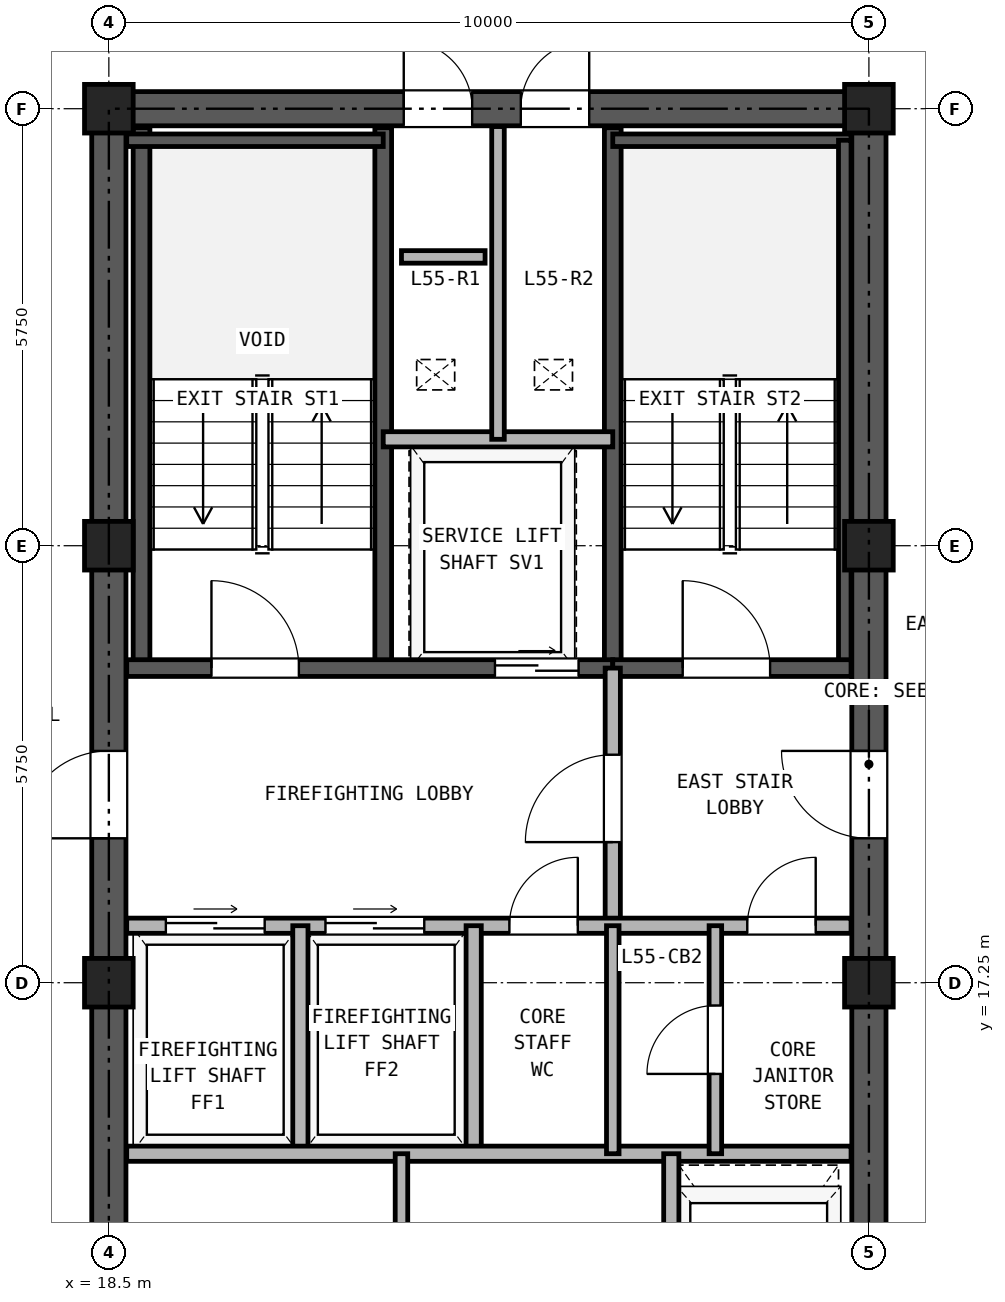
"""IFC4 building model, lengths in metres.
Left out: names, types, materials, properties, quantities, classifications, styles, units other than length and angle.
Written with IfcOpenShell. Run it as: python <this file> out.ifc"""

import sys

from ifc_helpers import new_model, si_unit, direction, frame, frame_2d, origin, origin_2d, place, context, subcontext, project, spatial, rectangle, hollow_rectangle, extrude, source, transform, mapped, element, fill, save


model = new_model("IFC4")
c1 = context("Model", 3, precision=1e-05, world=origin(), true_north=direction((0.0, 1.0)))
c2 = subcontext(c1, "Body", "Model", "MODEL_VIEW")
j1 = project(units=[si_unit("LENGTHUNIT", "METRE"), si_unit("PLANEANGLEUNIT", "RADIAN")], contexts=[c1])
p1 = place(None, origin())
s1 = spatial("IfcSite", under=j1, at=p1, CompositionType="ELEMENT")
p2 = place(p1, origin())
s2 = spatial("IfcBuilding", under=s1, at=p2, CompositionType="ELEMENT")
p3 = place(p2, frame((0.0, 0.0, 196.4)))
s3 = spatial("IfcBuildingStorey", under=s2, at=p3, CompositionType="ELEMENT", Elevation=196.4)
m1 = source(origin(), c2, "Body", "SweptSolid", [
    extrude(hollow_rectangle(XDim=0.64, YDim=0.64, WallThickness=0.035, at=origin_2d()), origin(), (0.0, 0.0, 1.0), 2.95),
])
for number, where, z_axis, x_axis in (
    (1, (18.5, 17.25, 0.0), (0.0, 0.0, 1.0), (1.0, 0.0, 0.0)),
    (2, (18.5, 23.0, 0.0), (0.0, 0.0, 1.0), (1.0, 0.0, 0.0)),
    (3, (18.5, 28.75, 0.0), (0.0, 0.0, 1.0), (1.0, 0.0, 0.0)),
    (4, (28.5, 17.25, 0.0), (0.0, 0.0, 1.0), (1.0, 0.0, 0.0)),
    (5, (28.5, 23.0, 0.0), (0.0, 0.0, 1.0), (1.0, 0.0, 0.0)),
    (6, (28.5, 28.75, 0.0), (0.0, 0.0, 1.0), (1.0, 0.0, 0.0)),
):
    element("IfcColumn", number, at=place(p3, frame(where, z_axis=z_axis, x_axis=x_axis)), inside=s3, PredefinedType="COLUMN", context=c2, shape_type="MappedRepresentation", body=[
        mapped(m1, transform((0.0, 0.0, 0.0), x_axis=(1.0, 0.0, 0.0), y_axis=(0.0, 1.0, 0.0), z_axis=(0.0, 0.0, 1.0), scale=1.0)),
    ])
p4 = place(p3, frame((18.275, 28.75, 0.0), z_axis=(0.0, 0.0, 1.0), x_axis=(1.0, 0.0, 0.0)))
e7 = element("IfcWall", 7, at=p4, inside=s3, PredefinedType="SHEAR", context=c2, shape_type="SweptSolid", body=[
    extrude(rectangle(XDim=10.45, YDim=0.45, at=frame_2d((5.225, 0.0))), origin(), (0.0, 0.0, 1.0), 2.95),
])
p5 = place(p4, frame((4.105, 0.0, 0.0)))
e8 = element("IfcOpeningElement", 8, at=p5, cuts=e7, PredefinedType="OPENING", context=c2, shape_type="SweptSolid", body=[
    extrude(rectangle(XDim=0.9, YDim=2.05, at=frame_2d((0.45, 1.025))), frame((0.0, 0.235, 0.0), z_axis=(0.0, -1.0, 0.0), x_axis=(1.0, 0.0, 0.0)), (0.0, 0.0, 1.0), 0.47),
])
p6 = place(p4, frame((5.645, 0.0, 0.0)))
e9 = element("IfcOpeningElement", 9, at=p6, cuts=e7, PredefinedType="OPENING", context=c2, shape_type="SweptSolid", body=[
    extrude(rectangle(XDim=0.9, YDim=2.05, at=frame_2d((0.45, 1.025))), frame((0.0, 0.235, 0.0), z_axis=(0.0, -1.0, 0.0), x_axis=(1.0, 0.0, 0.0)), (0.0, 0.0, 1.0), 0.47),
])
p7 = place(p3, frame((18.5, 11.725, 0.0), z_axis=(0.0, 0.0, 1.0), x_axis=(0.0, 1.0, 0.0)))
e10 = element("IfcWall", 10, at=p7, inside=s3, PredefinedType="SHEAR", context=c2, shape_type="SweptSolid", body=[
    extrude(rectangle(XDim=16.8, YDim=0.45, at=frame_2d((8.4, 0.0))), origin(), (0.0, 0.0, 1.0), 2.95),
])
p8 = place(p7, frame((7.425, 0.0, 0.0)))
e11 = element("IfcOpeningElement", 11, at=p8, cuts=e10, PredefinedType="OPENING", context=c2, shape_type="SweptSolid", body=[
    extrude(rectangle(XDim=1.15, YDim=2.2, at=frame_2d((0.575, 1.1))), frame((0.0, 0.235, 0.0), z_axis=(0.0, -1.0, 0.0), x_axis=(1.0, 0.0, 0.0)), (0.0, 0.0, 1.0), 0.47),
])
p9 = place(p3, frame((28.5, 11.725, 0.0), z_axis=(0.0, 0.0, 1.0), x_axis=(0.0, 1.0, 0.0)))
e12 = element("IfcWall", 12, at=p9, inside=s3, PredefinedType="SHEAR", context=c2, shape_type="SweptSolid", body=[
    extrude(rectangle(XDim=16.8, YDim=0.45, at=frame_2d((8.4, 0.0))), origin(), (0.0, 0.0, 1.0), 2.95),
])
p10 = place(p9, frame((7.425, 0.0, 0.0)))
e13 = element("IfcOpeningElement", 13, at=p10, cuts=e12, PredefinedType="OPENING", context=c2, shape_type="SweptSolid", body=[
    extrude(rectangle(XDim=1.15, YDim=2.2, at=frame_2d((0.575, 1.1))), frame((0.0, 0.235, 0.0), z_axis=(0.0, -1.0, 0.0), x_axis=(1.0, 0.0, 0.0)), (0.0, 0.0, 1.0), 0.47),
])
for number, where, z_axis, x_axis in (
    (14, (18.93, 21.39, 0.0), (0.0, 0.0, 1.0), (0.0, 1.0, 0.0)),
    (15, (22.11, 21.39, 0.0), (0.0, 0.0, 1.0), (0.0, 1.0, 0.0)),
    (16, (25.13, 21.39, 0.0), (0.0, 0.0, 1.0), (0.0, 1.0, 0.0)),
):
    element("IfcWall", number, at=place(p3, frame(where, z_axis=z_axis, x_axis=x_axis)), inside=s3, PredefinedType="SOLIDWALL", context=c2, shape_type="SweptSolid", body=[
        extrude(rectangle(XDim=7.11, YDim=0.22, at=frame_2d((3.555, 0.0))), origin(), (0.0, 0.0, 1.0), 2.95),
    ])
p11 = place(p3, frame((18.735, 28.335, 0.0), z_axis=(0.0, 0.0, 1.0), x_axis=(1.0, 0.0, 0.0)))
e17 = element("IfcWall", 17, at=p11, inside=s3, PredefinedType="PARTITIONING", context=c2, shape_type="SweptSolid", body=[
    extrude(rectangle(XDim=3.375, YDim=0.165, at=frame_2d((1.688, 0.0))), origin(), (0.0, 0.0, 1.0), 2.95),
])
p12 = place(p3, frame((25.13, 28.335, 0.0), z_axis=(0.0, 0.0, 1.0), x_axis=(1.0, 0.0, 0.0)))
e18 = element("IfcWall", 18, at=p12, inside=s3, PredefinedType="PARTITIONING", context=c2, shape_type="SweptSolid", body=[
    extrude(rectangle(XDim=3.135, YDim=0.165, at=frame_2d((1.567, 0.0))), origin(), (0.0, 0.0, 1.0), 2.95),
])
p13 = place(p3, frame((28.183, 21.39, 0.0), z_axis=(0.0, 0.0, 1.0), x_axis=(0.0, 1.0, 0.0)))
e19 = element("IfcWall", 19, at=p13, inside=s3, PredefinedType="PARTITIONING", context=c2, shape_type="SweptSolid", body=[
    extrude(rectangle(XDim=6.945, YDim=0.165, at=frame_2d((3.473, 0.0))), origin(), (0.0, 0.0, 1.0), 2.95),
])
p14 = place(p3, frame((18.735, 21.39, 0.0), z_axis=(0.0, 0.0, 1.0), x_axis=(1.0, 0.0, 0.0)))
e20 = element("IfcWall", 20, at=p14, inside=s3, PredefinedType="SOLIDWALL", context=c2, shape_type="SweptSolid", body=[
    extrude(rectangle(XDim=6.395, YDim=0.22, at=frame_2d((3.197, 0.0))), origin(), (0.0, 0.0, 1.0), 2.95),
])
p15 = place(p14, frame((1.115, 0.0, 0.0)))
e21 = element("IfcOpeningElement", 21, at=p15, cuts=e20, PredefinedType="OPENING", context=c2, shape_type="SweptSolid", body=[
    extrude(rectangle(XDim=1.15, YDim=2.2, at=frame_2d((0.575, 1.1))), frame((0.0, 0.12, 0.0), z_axis=(0.0, -1.0, 0.0), x_axis=(1.0, 0.0, 0.0)), (0.0, 0.0, 1.0), 0.24),
])
p16 = place(p14, frame((4.845, 0.0, 0.0)))
e22 = element("IfcOpeningElement", 22, at=p16, cuts=e20, PredefinedType="OPENING", context=c2, shape_type="SweptSolid", body=[
    extrude(rectangle(XDim=1.1, YDim=2.25, at=frame_2d((0.55, 1.125))), frame((0.0, 0.12, 0.0), z_axis=(0.0, -1.0, 0.0), x_axis=(1.0, 0.0, 0.0)), (0.0, 0.0, 1.0), 0.24),
])
p17 = place(p3, frame((25.13, 21.39, 0.0), z_axis=(0.0, 0.0, 1.0), x_axis=(1.0, 0.0, 0.0)))
e23 = element("IfcWall", 23, at=p17, inside=s3, PredefinedType="SOLIDWALL", context=c2, shape_type="SweptSolid", body=[
    extrude(rectangle(XDim=3.135, YDim=0.22, at=frame_2d((1.567, 0.0))), origin(), (0.0, 0.0, 1.0), 2.95),
])
p18 = place(p17, frame((0.92, 0.0, 0.0)))
e24 = element("IfcOpeningElement", 24, at=p18, cuts=e23, PredefinedType="OPENING", context=c2, shape_type="SweptSolid", body=[
    extrude(rectangle(XDim=1.15, YDim=2.2, at=frame_2d((0.575, 1.1))), frame((0.0, 0.12, 0.0), z_axis=(0.0, -1.0, 0.0), x_axis=(1.0, 0.0, 0.0)), (0.0, 0.0, 1.0), 0.24),
])
p19 = place(p3, frame((22.11, 24.4, 0.0), z_axis=(0.0, 0.0, 1.0), x_axis=(1.0, 0.0, 0.0)))
e25 = element("IfcWall", 25, at=p19, inside=s3, PredefinedType="PARTITIONING", context=c2, shape_type="SweptSolid", body=[
    extrude(rectangle(XDim=3.02, YDim=0.2, at=frame_2d((1.51, 0.0))), origin(), (0.0, 0.0, 1.0), 2.95),
])
p20 = place(p3, frame((23.62, 24.4, 0.0), z_axis=(0.0, 0.0, 1.0), x_axis=(0.0, 1.0, 0.0)))
e26 = element("IfcWall", 26, at=p20, inside=s3, PredefinedType="PARTITIONING", context=c2, shape_type="SweptSolid", body=[
    extrude(rectangle(XDim=4.115, YDim=0.165, at=frame_2d((2.058, 0.0))), origin(), (0.0, 0.0, 1.0), 2.95),
])
p21 = place(p3, frame((25.13, 18.0, 0.0), z_axis=(0.0, 0.0, 1.0), x_axis=(0.0, 1.0, 0.0)))
e27 = element("IfcWall", 27, at=p21, inside=s3, PredefinedType="PARTITIONING", context=c2, shape_type="SweptSolid", body=[
    extrude(rectangle(XDim=3.39, YDim=0.2, at=frame_2d((1.695, 0.0))), origin(), (0.0, 0.0, 1.0), 2.95),
])
p22 = place(p21, frame((1.1, 0.0, 0.0)))
e28 = element("IfcOpeningElement", 28, at=p22, cuts=e27, PredefinedType="OPENING", context=c2, shape_type="SweptSolid", body=[
    extrude(rectangle(XDim=1.15, YDim=2.2, at=frame_2d((0.575, 1.1))), frame((0.0, 0.11, 0.0), z_axis=(0.0, -1.0, 0.0), x_axis=(1.0, 0.0, 0.0)), (0.0, 0.0, 1.0), 0.22),
])
p23 = place(p3, frame((18.735, 18.0, 0.0), z_axis=(0.0, 0.0, 1.0), x_axis=(1.0, 0.0, 0.0)))
e29 = element("IfcWall", 29, at=p23, inside=s3, PredefinedType="PARTITIONING", context=c2, shape_type="SweptSolid", body=[
    extrude(rectangle(XDim=9.53, YDim=0.2, at=frame_2d((4.765, 0.0))), origin(), (0.0, 0.0, 1.0), 2.95),
])
p24 = place(p23, frame((0.515, 0.0, 0.0)))
e30 = element("IfcOpeningElement", 30, at=p24, cuts=e29, PredefinedType="OPENING", context=c2, shape_type="SweptSolid", body=[
    extrude(rectangle(XDim=1.3, YDim=2.3, at=frame_2d((0.65, 1.15))), frame((0.0, 0.11, 0.0), z_axis=(0.0, -1.0, 0.0), x_axis=(1.0, 0.0, 0.0)), (0.0, 0.0, 1.0), 0.22),
])
p25 = place(p23, frame((2.615, 0.0, 0.0)))
e31 = element("IfcOpeningElement", 31, at=p25, cuts=e29, PredefinedType="OPENING", context=c2, shape_type="SweptSolid", body=[
    extrude(rectangle(XDim=1.3, YDim=2.3, at=frame_2d((0.65, 1.15))), frame((0.0, 0.11, 0.0), z_axis=(0.0, -1.0, 0.0), x_axis=(1.0, 0.0, 0.0)), (0.0, 0.0, 1.0), 0.22),
])
p26 = place(p23, frame((5.035, 0.0, 0.0)))
e32 = element("IfcOpeningElement", 32, at=p26, cuts=e29, PredefinedType="OPENING", context=c2, shape_type="SweptSolid", body=[
    extrude(rectangle(XDim=0.9, YDim=2.05, at=frame_2d((0.45, 1.025))), frame((0.0, 0.11, 0.0), z_axis=(0.0, -1.0, 0.0), x_axis=(1.0, 0.0, 0.0)), (0.0, 0.0, 1.0), 0.22),
])
p27 = place(p23, frame((8.165, 0.0, 0.0)))
e33 = element("IfcOpeningElement", 33, at=p27, cuts=e29, PredefinedType="OPENING", context=c2, shape_type="SweptSolid", body=[
    extrude(rectangle(XDim=0.9, YDim=2.05, at=frame_2d((0.45, 1.025))), frame((0.0, 0.11, 0.0), z_axis=(0.0, -1.0, 0.0), x_axis=(1.0, 0.0, 0.0)), (0.0, 0.0, 1.0), 0.22),
])
for number, where, z_axis, x_axis in (
    (34, (21.02, 15.0, 0.0), (0.0, 0.0, 1.0), (0.0, 1.0, 0.0)),
    (35, (23.3, 15.0, 0.0), (0.0, 0.0, 1.0), (0.0, 1.0, 0.0)),
):
    element("IfcWall", number, at=place(p3, frame(where, z_axis=z_axis, x_axis=x_axis)), inside=s3, PredefinedType="PARTITIONING", context=c2, shape_type="SweptSolid", body=[
        extrude(rectangle(XDim=3.0, YDim=0.2, at=frame_2d((1.5, 0.0))), origin(), (0.0, 0.0, 1.0), 2.95),
    ])
p28 = place(p3, frame((18.735, 15.0, 0.0), z_axis=(0.0, 0.0, 1.0), x_axis=(1.0, 0.0, 0.0)))
e36 = element("IfcWall", 36, at=p28, inside=s3, PredefinedType="PARTITIONING", context=c2, shape_type="SweptSolid", body=[
    extrude(rectangle(XDim=9.53, YDim=0.2, at=frame_2d((4.765, 0.0))), origin(), (0.0, 0.0, 1.0), 2.95),
])
p29 = place(p3, frame((25.13, 15.0, 0.0), z_axis=(0.0, 0.0, 1.0), x_axis=(0.0, 1.0, 0.0)))
e37 = element("IfcWall", 37, at=p29, inside=s3, PredefinedType="PARTITIONING", context=c2, shape_type="SweptSolid", body=[
    extrude(rectangle(XDim=3.0, YDim=0.165, at=frame_2d((1.5, 0.0))), origin(), (0.0, 0.0, 1.0), 2.95),
])
p30 = place(p3, frame((26.48, 15.0, 0.0), z_axis=(0.0, 0.0, 1.0), x_axis=(0.0, 1.0, 0.0)))
e38 = element("IfcWall", 38, at=p30, inside=s3, PredefinedType="PARTITIONING", context=c2, shape_type="SweptSolid", body=[
    extrude(rectangle(XDim=3.0, YDim=0.165, at=frame_2d((1.5, 0.0))), origin(), (0.0, 0.0, 1.0), 2.95),
])
p31 = place(p30, frame((1.05, 0.0, 0.0)))
e39 = element("IfcOpeningElement", 39, at=p31, cuts=e38, PredefinedType="OPENING", context=c2, shape_type="SweptSolid", body=[
    extrude(rectangle(XDim=0.9, YDim=2.05, at=frame_2d((0.45, 1.025))), frame((0.0, 0.093, 0.0), z_axis=(0.0, -1.0, 0.0), x_axis=(1.0, 0.0, 0.0)), (0.0, 0.0, 1.0), 0.185),
])
p32 = place(p3, frame((22.35, 11.735, 0.0), z_axis=(0.0, 0.0, 1.0), x_axis=(0.0, 1.0, 0.0)))
e40 = element("IfcWall", 40, at=p32, inside=s3, PredefinedType="PARTITIONING", context=c2, shape_type="SweptSolid", body=[
    extrude(rectangle(XDim=3.265, YDim=0.165, at=frame_2d((1.632, 0.0))), origin(), (0.0, 0.0, 1.0), 2.95),
])
p33 = place(p3, frame((25.9, 11.735, 0.0), z_axis=(0.0, 0.0, 1.0), x_axis=(0.0, 1.0, 0.0)))
e41 = element("IfcWall", 41, at=p33, inside=s3, PredefinedType="PARTITIONING", context=c2, shape_type="SweptSolid", body=[
    extrude(rectangle(XDim=3.265, YDim=0.2, at=frame_2d((1.632, 0.0))), origin(), (0.0, 0.0, 1.0), 2.95),
])
p34 = place(p3, frame((22.35, 26.8, 0.0), z_axis=(0.0, 0.0, 1.0), x_axis=(1.0, 0.0, 0.0)))
e42 = element("IfcWall", 42, at=p34, inside=s3, PredefinedType="PARTITIONING", context=c2, shape_type="SweptSolid", body=[
    extrude(rectangle(XDim=1.1, YDim=0.165, at=frame_2d((0.55, 0.0))), origin(), (0.0, 0.0, 1.0), 2.95),
])
p35 = place(p15, frame((1.15, 0.0, 0.0), z_axis=(0.0, 0.0, 1.0), x_axis=(-1.0, 0.0, 0.0)))
e43 = element("IfcDoor", 43, at=p35, inside=s3, OperationType="SINGLE_SWING_LEFT", PredefinedType="DOOR", context=c2, shape_type="SweptSolid", body=[
    extrude(rectangle(XDim=1.15, YDim=2.2, at=frame_2d((0.575, 1.1))), frame((0.0, 0.025, 0.0), z_axis=(0.0, -1.0, 0.0), x_axis=(1.0, 0.0, 0.0)), (0.0, 0.0, 1.0), 0.05),
])
fill(e21, e43)
p36 = place(p18, frame((1.15, 0.0, 0.0), z_axis=(0.0, 0.0, 1.0), x_axis=(-1.0, 0.0, 0.0)))
e44 = element("IfcDoor", 44, at=p36, inside=s3, OperationType="SINGLE_SWING_LEFT", PredefinedType="DOOR", context=c2, shape_type="SweptSolid", body=[
    extrude(rectangle(XDim=1.15, YDim=2.2, at=frame_2d((0.575, 1.1))), frame((0.0, 0.025, 0.0), z_axis=(0.0, -1.0, 0.0), x_axis=(1.0, 0.0, 0.0)), (0.0, 0.0, 1.0), 0.05),
])
fill(e24, e44)
p37 = place(p16, frame((1.1, 0.0, 0.0), z_axis=(0.0, 0.0, 1.0), x_axis=(-1.0, 0.0, 0.0)))
e45 = element("IfcDoor", 45, at=p37, inside=s3, OperationType="DOUBLE_DOOR_SLIDING", PredefinedType="DOOR", context=c2, shape_type="SweptSolid", body=[
    extrude(rectangle(XDim=1.1, YDim=2.25, at=frame_2d((0.55, 1.125))), frame((0.0, 0.025, 0.0), z_axis=(0.0, -1.0, 0.0), x_axis=(1.0, 0.0, 0.0)), (0.0, 0.0, 1.0), 0.05),
])
fill(e22, e45)
p38 = place(p22, origin())
e46 = element("IfcDoor", 46, at=p38, inside=s3, OperationType="SINGLE_SWING_LEFT", PredefinedType="DOOR", context=c2, shape_type="SweptSolid", body=[
    extrude(rectangle(XDim=1.15, YDim=2.2, at=frame_2d((0.575, 1.1))), frame((0.0, 0.025, 0.0), z_axis=(0.0, -1.0, 0.0), x_axis=(1.0, 0.0, 0.0)), (0.0, 0.0, 1.0), 0.05),
])
fill(e28, e46)
p39 = place(p24, origin())
e47 = element("IfcDoor", 47, at=p39, inside=s3, OperationType="DOUBLE_DOOR_SLIDING", PredefinedType="DOOR", context=c2, shape_type="SweptSolid", body=[
    extrude(rectangle(XDim=1.3, YDim=2.3, at=frame_2d((0.65, 1.15))), frame((0.0, 0.025, 0.0), z_axis=(0.0, -1.0, 0.0), x_axis=(1.0, 0.0, 0.0)), (0.0, 0.0, 1.0), 0.05),
])
fill(e30, e47)
p40 = place(p25, origin())
e48 = element("IfcDoor", 48, at=p40, inside=s3, OperationType="DOUBLE_DOOR_SLIDING", PredefinedType="DOOR", context=c2, shape_type="SweptSolid", body=[
    extrude(rectangle(XDim=1.3, YDim=2.3, at=frame_2d((0.65, 1.15))), frame((0.0, 0.025, 0.0), z_axis=(0.0, -1.0, 0.0), x_axis=(1.0, 0.0, 0.0)), (0.0, 0.0, 1.0), 0.05),
])
fill(e31, e48)
p41 = place(p26, frame((0.9, 0.0, 0.0), z_axis=(0.0, 0.0, 1.0), x_axis=(-1.0, 0.0, 0.0)))
e49 = element("IfcDoor", 49, at=p41, inside=s3, OperationType="SINGLE_SWING_RIGHT", PredefinedType="DOOR", context=c2, shape_type="SweptSolid", body=[
    extrude(rectangle(XDim=0.9, YDim=2.05, at=frame_2d((0.45, 1.025))), frame((0.0, 0.025, 0.0), z_axis=(0.0, -1.0, 0.0), x_axis=(1.0, 0.0, 0.0)), (0.0, 0.0, 1.0), 0.05),
])
fill(e32, e49)
p42 = place(p31, origin())
e50 = element("IfcDoor", 50, at=p42, inside=s3, OperationType="SINGLE_SWING_LEFT", PredefinedType="DOOR", context=c2, shape_type="SweptSolid", body=[
    extrude(rectangle(XDim=0.9, YDim=2.05, at=frame_2d((0.45, 1.025))), frame((0.0, 0.025, 0.0), z_axis=(0.0, -1.0, 0.0), x_axis=(1.0, 0.0, 0.0)), (0.0, 0.0, 1.0), 0.05),
])
fill(e39, e50)
p43 = place(p27, frame((0.9, 0.0, 0.0), z_axis=(0.0, 0.0, 1.0), x_axis=(-1.0, 0.0, 0.0)))
e51 = element("IfcDoor", 51, at=p43, inside=s3, OperationType="SINGLE_SWING_RIGHT", PredefinedType="DOOR", context=c2, shape_type="SweptSolid", body=[
    extrude(rectangle(XDim=0.9, YDim=2.05, at=frame_2d((0.45, 1.025))), frame((0.0, 0.025, 0.0), z_axis=(0.0, -1.0, 0.0), x_axis=(1.0, 0.0, 0.0)), (0.0, 0.0, 1.0), 0.05),
])
fill(e33, e51)
p44 = place(p8, frame((1.15, 0.0, 0.0), z_axis=(0.0, 0.0, 1.0), x_axis=(-1.0, 0.0, 0.0)))
e52 = element("IfcDoor", 52, at=p44, inside=s3, OperationType="SINGLE_SWING_LEFT", PredefinedType="DOOR", context=c2, shape_type="SweptSolid", body=[
    extrude(rectangle(XDim=1.15, YDim=2.2, at=frame_2d((0.575, 1.1))), frame((0.0, 0.025, 0.0), z_axis=(0.0, -1.0, 0.0), x_axis=(1.0, 0.0, 0.0)), (0.0, 0.0, 1.0), 0.05),
])
fill(e11, e52)
p45 = place(p10, origin())
e53 = element("IfcDoor", 53, at=p45, inside=s3, OperationType="SINGLE_SWING_RIGHT", PredefinedType="DOOR", context=c2, shape_type="SweptSolid", body=[
    extrude(rectangle(XDim=1.15, YDim=2.2, at=frame_2d((0.575, 1.1))), frame((0.0, 0.025, 0.0), z_axis=(0.0, -1.0, 0.0), x_axis=(1.0, 0.0, 0.0)), (0.0, 0.0, 1.0), 0.05),
])
fill(e13, e53)
p46 = place(p5, origin())
e54 = element("IfcDoor", 54, at=p46, inside=s3, OperationType="SINGLE_SWING_LEFT", PredefinedType="DOOR", context=c2, shape_type="SweptSolid", body=[
    extrude(rectangle(XDim=0.9, YDim=2.05, at=frame_2d((0.45, 1.025))), frame((0.0, 0.025, 0.0), z_axis=(0.0, -1.0, 0.0), x_axis=(1.0, 0.0, 0.0)), (0.0, 0.0, 1.0), 0.05),
])
fill(e8, e54)
p47 = place(p6, origin())
e55 = element("IfcDoor", 55, at=p47, inside=s3, OperationType="SINGLE_SWING_RIGHT", PredefinedType="DOOR", context=c2, shape_type="SweptSolid", body=[
    extrude(rectangle(XDim=0.9, YDim=2.05, at=frame_2d((0.45, 1.025))), frame((0.0, 0.025, 0.0), z_axis=(0.0, -1.0, 0.0), x_axis=(1.0, 0.0, 0.0)), (0.0, 0.0, 1.0), 0.05),
])
fill(e9, e55)
save(model, sys.argv[1])
